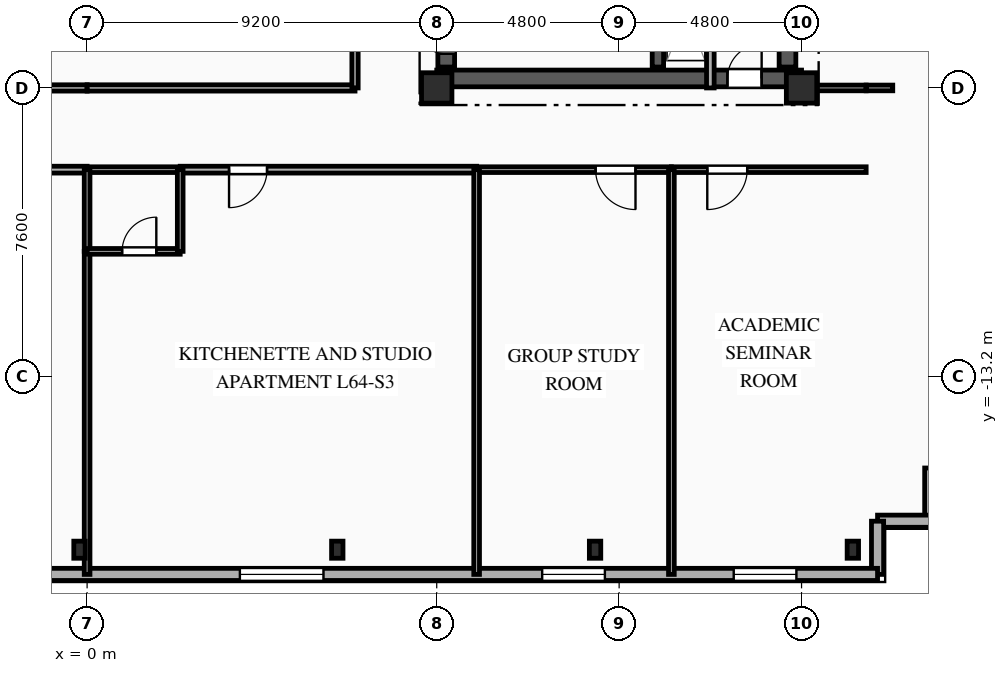
"""IFC4 building model, lengths in metres.
Left out: names, types, materials, properties, quantities, classifications, styles, units other than length and angle.
Written with IfcOpenShell. Run it as: python <this file> out.ifc"""

import sys

from ifc_helpers import new_model, si_unit, direction, frame, frame_2d, origin, origin_2d, place, context, subcontext, project, spatial, rectangle, i_section, extrude, element, fill, save


model = new_model("IFC4")
c1 = context("Model", 3, precision=1e-05, world=origin(), true_north=direction((0.0, 1.0)))
c2 = subcontext(c1, "Body", "Model", "MODEL_VIEW")
j1 = project(units=[si_unit("LENGTHUNIT", "METRE"), si_unit("PLANEANGLEUNIT", "RADIAN")], contexts=[c1])
p1 = place(None, origin())
s1 = spatial("IfcSite", under=j1, at=p1, CompositionType="ELEMENT")
p2 = place(p1, origin())
s2 = spatial("IfcBuilding", under=s1, at=p2, CompositionType="ELEMENT")
p3 = place(p2, frame((0.0, 0.0, 228.3)))
s3 = spatial("IfcBuildingStorey", under=s2, at=p3, CompositionType="ELEMENT", Elevation=228.3)
for number, where, z_axis, x_axis in (
    (1, (9.2, -5.6, 0.0), (0.0, 0.0, 1.0), (1.0, 0.0, 0.0)),
    (2, (18.8, -5.6, 0.0), (0.0, 0.0, 1.0), (1.0, 0.0, 0.0)),
):
    element("IfcColumn", number, at=place(p3, frame(where, z_axis=z_axis, x_axis=x_axis)), inside=s3, PredefinedType="COLUMN", context=c2, shape_type="SweptSolid", body=[
        extrude(rectangle(XDim=0.8, YDim=0.8, at=origin_2d()), origin(), (0.0, 0.0, 1.0), 3.35),
    ])
for number, where, z_axis, x_axis in (
    (3, (-0.2, -17.75, 0.0), (0.0, 0.0, 1.0), (1.0, 0.0, 0.0)),
    (4, (6.583, -17.75, 0.0), (0.0, 0.0, 1.0), (1.0, 0.0, 0.0)),
    (5, (13.367, -17.75, 0.0), (0.0, 0.0, 1.0), (1.0, 0.0, 0.0)),
    (6, (20.15, -17.75, 0.0), (0.0, 0.0, 1.0), (1.0, 0.0, 0.0)),
):
    element("IfcColumn", number, at=place(p3, frame(where, z_axis=z_axis, x_axis=x_axis)), inside=s3, PredefinedType="COLUMN", context=c2, shape_type="SweptSolid", body=[
        extrude(i_section(OverallWidth=0.3, OverallDepth=0.45, WebThickness=0.014, FlangeThickness=0.026, FilletRadius=0.027, at=origin_2d()), origin(), (0.0, 0.0, 1.0), 3.35),
    ])
for number, where, z_axis, x_axis in (
    (7, (22.2, -15.6, 0.0), (0.0, 0.0, 1.0), (0.0, -1.0, 0.0)),
    (8, (22.2, -17.0, 0.0), (0.0, 0.0, 1.0), (-1.0, 0.0, 0.0)),
    (9, (20.8, -17.0, 0.0), (0.0, 0.0, 1.0), (0.0, -1.0, 0.0)),
):
    element("IfcWall", number, at=place(p3, frame(where, z_axis=z_axis, x_axis=x_axis)), inside=s3, PredefinedType="SOLIDWALL", context=c2, shape_type="SweptSolid", body=[
        extrude(rectangle(XDim=1.4, YDim=0.32, at=frame_2d((0.7, 0.0))), origin(), (0.0, 0.0, 1.0), 3.04),
    ])
p4 = place(p3, frame((20.8, -18.4, 0.0), z_axis=(0.0, 0.0, 1.0), x_axis=(-1.0, 0.0, 0.0)))
e10 = element("IfcWall", 10, at=p4, inside=s3, PredefinedType="SOLIDWALL", context=c2, shape_type="SweptSolid", body=[
    extrude(rectangle(XDim=42.0, YDim=0.32, at=frame_2d((21.0, 0.0))), origin(), (0.0, 0.0, 1.0), 3.04),
])
p5 = place(p4, frame((2.135, 0.0, 0.85)))
e11 = element("IfcOpeningElement", 11, at=p5, cuts=e10, PredefinedType="OPENING", context=c2, shape_type="SweptSolid", body=[
    extrude(rectangle(XDim=1.65, YDim=1.85, at=frame_2d((0.825, 0.925))), frame((0.0, 0.17, 0.0), z_axis=(0.0, -1.0, 0.0), x_axis=(1.0, 0.0, 0.0)), (0.0, 0.0, 1.0), 0.34),
])
p6 = place(p4, frame((7.175, 0.0, 0.85)))
e12 = element("IfcOpeningElement", 12, at=p6, cuts=e10, PredefinedType="OPENING", context=c2, shape_type="SweptSolid", body=[
    extrude(rectangle(XDim=1.65, YDim=1.85, at=frame_2d((0.825, 0.925))), frame((0.0, 0.17, 0.0), z_axis=(0.0, -1.0, 0.0), x_axis=(1.0, 0.0, 0.0)), (0.0, 0.0, 1.0), 0.34),
])
p7 = place(p4, frame((14.58, 0.0, 0.85)))
e13 = element("IfcOpeningElement", 13, at=p7, cuts=e10, PredefinedType="OPENING", context=c2, shape_type="SweptSolid", body=[
    extrude(rectangle(XDim=2.2, YDim=1.85, at=frame_2d((1.1, 0.925))), frame((0.0, 0.17, 0.0), z_axis=(0.0, -1.0, 0.0), x_axis=(1.0, 0.0, 0.0)), (0.0, 0.0, 1.0), 0.34),
])
p8 = place(p4, frame((24.9, 0.0, 0.85)))
e14 = element("IfcOpeningElement", 14, at=p8, cuts=e10, PredefinedType="OPENING", context=c2, shape_type="SweptSolid", body=[
    extrude(rectangle(XDim=2.2, YDim=1.85, at=frame_2d((1.1, 0.925))), frame((0.0, 0.17, 0.0), z_axis=(0.0, -1.0, 0.0), x_axis=(1.0, 0.0, 0.0)), (0.0, 0.0, 1.0), 0.34),
])
p9 = place(p4, frame((32.855, 0.0, 0.85)))
e15 = element("IfcOpeningElement", 15, at=p9, cuts=e10, PredefinedType="OPENING", context=c2, shape_type="SweptSolid", body=[
    extrude(rectangle(XDim=1.65, YDim=1.85, at=frame_2d((0.825, 0.925))), frame((0.0, 0.17, 0.0), z_axis=(0.0, -1.0, 0.0), x_axis=(1.0, 0.0, 0.0)), (0.0, 0.0, 1.0), 0.34),
])
p10 = place(p4, frame((37.975, 0.0, 0.85)))
e16 = element("IfcOpeningElement", 16, at=p10, cuts=e10, PredefinedType="OPENING", context=c2, shape_type="SweptSolid", body=[
    extrude(rectangle(XDim=1.65, YDim=1.85, at=frame_2d((0.825, 0.925))), frame((0.0, 0.17, 0.0), z_axis=(0.0, -1.0, 0.0), x_axis=(1.0, 0.0, 0.0)), (0.0, 0.0, 1.0), 0.34),
])
p11 = place(p3, frame((9.2, -5.35, 0.0), z_axis=(0.0, 0.0, 1.0), x_axis=(1.0, 0.0, 0.0)))
e17 = element("IfcWall", 17, at=p11, inside=s3, PredefinedType="SHEAR", context=c2, shape_type="SweptSolid", body=[
    extrude(rectangle(XDim=9.6, YDim=0.44, at=frame_2d((4.8, 0.0))), origin(), (0.0, 0.0, 1.0), 3.04),
])
p12 = place(p11, frame((7.65, 0.0, 0.0)))
e18 = element("IfcOpeningElement", 18, at=p12, cuts=e17, PredefinedType="OPENING", context=c2, shape_type="SweptSolid", body=[
    extrude(rectangle(XDim=0.9, YDim=2.1, at=frame_2d((0.45, 1.05))), frame((0.0, 0.23, 0.0), z_axis=(0.0, -1.0, 0.0), x_axis=(1.0, 0.0, 0.0)), (0.0, 0.0, 1.0), 0.46),
])
p13 = place(p3, frame((9.45, -5.05, 0.0), z_axis=(0.0, 0.0, 1.0), x_axis=(0.0, 1.0, 0.0)))
e19 = element("IfcWall", 19, at=p13, inside=s3, PredefinedType="SHEAR", context=c2, shape_type="SweptSolid", body=[
    extrude(rectangle(XDim=10.1, YDim=0.44, at=frame_2d((5.05, 0.0))), origin(), (0.0, 0.0, 1.0), 3.04),
])
p14 = place(p13, frame((7.15, 0.0, 0.0)))
e20 = element("IfcOpeningElement", 20, at=p14, cuts=e19, PredefinedType="OPENING", context=c2, shape_type="SweptSolid", body=[
    extrude(rectangle(XDim=0.9, YDim=2.1, at=frame_2d((0.45, 1.05))), frame((0.0, 0.23, 0.0), z_axis=(0.0, -1.0, 0.0), x_axis=(1.0, 0.0, 0.0)), (0.0, 0.0, 1.0), 0.46),
])
p15 = place(p13, frame((2.4, 0.0, 0.0)))
e21 = element("IfcOpeningElement", 21, at=p15, cuts=e19, PredefinedType="OPENING", context=c2, shape_type="SweptSolid", body=[
    extrude(rectangle(XDim=1.2, YDim=2.15, at=frame_2d((0.6, 1.075))), frame((0.0, 0.23, 0.0), z_axis=(0.0, -1.0, 0.0), x_axis=(1.0, 0.0, 0.0)), (0.0, 0.0, 1.0), 0.46),
])
p16 = place(p13, frame((0.35, 0.0, 0.0)))
e22 = element("IfcOpeningElement", 22, at=p16, cuts=e19, PredefinedType="OPENING", context=c2, shape_type="SweptSolid", body=[
    extrude(rectangle(XDim=0.9, YDim=2.1, at=frame_2d((0.45, 1.05))), frame((0.0, 0.23, 0.0), z_axis=(0.0, -1.0, 0.0), x_axis=(1.0, 0.0, 0.0)), (0.0, 0.0, 1.0), 0.46),
])
p17 = place(p3, frame((18.43, -5.05, 0.0), z_axis=(0.0, 0.0, 1.0), x_axis=(0.0, 1.0, 0.0)))
e23 = element("IfcWall", 23, at=p17, inside=s3, PredefinedType="SHEAR", context=c2, shape_type="SweptSolid", body=[
    extrude(rectangle(XDim=10.1, YDim=0.44, at=frame_2d((5.05, 0.0))), origin(), (0.0, 0.0, 1.0), 3.04),
])
p18 = place(p3, frame((15.02, -5.05, 0.0), z_axis=(0.0, 0.0, 1.0), x_axis=(0.0, 1.0, 0.0)))
e24 = element("IfcWall", 24, at=p18, inside=s3, PredefinedType="SHEAR", context=c2, shape_type="SweptSolid", body=[
    extrude(rectangle(XDim=10.1, YDim=0.3, at=frame_2d((5.05, 0.0))), origin(), (0.0, 0.0, 1.0), 3.04),
])
p19 = place(p3, frame((16.4, -2.11, 0.0), z_axis=(0.0, 0.0, 1.0), x_axis=(0.0, -1.0, 0.0)))
e25 = element("IfcWall", 25, at=p19, inside=s3, PredefinedType="PARTITIONING", context=c2, shape_type="SweptSolid", body=[
    extrude(rectangle(XDim=3.49, YDim=0.2, at=frame_2d((1.745, 0.0))), origin(), (0.0, 0.0, 1.0), 3.04),
])
p20 = place(p3, frame((0.0, -7.75, 0.0), z_axis=(0.0, 0.0, 1.0), x_axis=(-1.0, 0.0, 0.0)))
e26 = element("IfcWall", 26, at=p20, inside=s3, PredefinedType="PARTITIONING", context=c2, shape_type="SweptSolid", body=[
    extrude(rectangle(XDim=7.8, YDim=0.18, at=frame_2d((3.9, 0.0))), origin(), (0.0, 0.0, 1.0), 3.04),
])
p21 = place(p20, frame((1.285, 0.0, 0.0)))
e27 = element("IfcOpeningElement", 27, at=p21, cuts=e26, PredefinedType="OPENING", context=c2, shape_type="SweptSolid", body=[
    extrude(rectangle(XDim=1.0, YDim=2.15, at=frame_2d((0.5, 1.075))), frame((0.0, 0.1, 0.0), z_axis=(0.0, -1.0, 0.0), x_axis=(1.0, 0.0, 0.0)), (0.0, 0.0, 1.0), 0.2),
])
p22 = place(p3, frame((-7.05, -5.6, 0.0), z_axis=(0.0, 0.0, 1.0), x_axis=(1.0, 0.0, 0.0)))
e28 = element("IfcWall", 28, at=p22, inside=s3, PredefinedType="PARTITIONING", context=c2, shape_type="SweptSolid", body=[
    extrude(rectangle(XDim=7.05, YDim=0.165, at=frame_2d((3.525, 0.0))), origin(), (0.0, 0.0, 1.0), 2.525),
])
p23 = place(p22, frame((4.728, 0.0, 0.0)))
e29 = element("IfcOpeningElement", 29, at=p23, cuts=e28, PredefinedType="OPENING", context=c2, shape_type="SweptSolid", body=[
    extrude(rectangle(XDim=1.15, YDim=2.15, at=frame_2d((0.575, 1.075))), frame((0.0, 0.093, 0.0), z_axis=(0.0, -1.0, 0.0), x_axis=(1.0, 0.0, 0.0)), (0.0, 0.0, 1.0), 0.185),
])
p24 = place(p3, frame((18.8, -5.6, 0.0), z_axis=(0.0, 0.0, 1.0), x_axis=(1.0, 0.0, 0.0)))
e30 = element("IfcWall", 30, at=p24, inside=s3, PredefinedType="PARTITIONING", context=c2, shape_type="SweptSolid", body=[
    extrude(rectangle(XDim=1.7, YDim=0.15, at=frame_2d((0.85, 0.0))), origin(), (0.0, 0.0, 1.0), 3.04),
])
p25 = place(p3, frame((20.5, -5.6, 0.0), z_axis=(0.0, 0.0, 1.0), x_axis=(1.0, 0.0, 0.0)))
e31 = element("IfcWall", 31, at=p25, inside=s3, PredefinedType="PARTITIONING", context=c2, shape_type="SweptSolid", body=[
    extrude(rectangle(XDim=0.7, YDim=0.15, at=frame_2d((0.35, 0.0))), origin(), (0.0, 0.0, 1.0), 3.04),
])
p26 = place(p3, frame((10.25, -7.75, 0.0), z_axis=(0.0, 0.0, 1.0), x_axis=(-1.0, 0.0, 0.0)))
e32 = element("IfcWall", 32, at=p26, inside=s3, PredefinedType="PARTITIONING", context=c2, shape_type="SweptSolid", body=[
    extrude(rectangle(XDim=7.8, YDim=0.18, at=frame_2d((3.9, 0.0))), origin(), (0.0, 0.0, 1.0), 3.04),
])
p27 = place(p26, frame((5.515, 0.0, 0.0)))
e33 = element("IfcOpeningElement", 33, at=p27, cuts=e32, PredefinedType="OPENING", context=c2, shape_type="SweptSolid", body=[
    extrude(rectangle(XDim=1.0, YDim=2.15, at=frame_2d((0.5, 1.075))), frame((0.0, 0.1, 0.0), z_axis=(0.0, -1.0, 0.0), x_axis=(1.0, 0.0, 0.0)), (0.0, 0.0, 1.0), 0.2),
])
p28 = place(p3, frame((2.45, -7.75, 0.0), z_axis=(0.0, 0.0, 1.0), x_axis=(-1.0, 0.0, 0.0)))
e34 = element("IfcWall", 34, at=p28, inside=s3, PredefinedType="PLUMBINGWALL", context=c2, shape_type="SweptSolid", body=[
    extrude(rectangle(XDim=2.45, YDim=0.15, at=frame_2d((1.225, 0.0))), origin(), (0.0, 0.0, 1.0), 3.04),
])
p29 = place(p3, frame((15.375, -7.75, 0.0), z_axis=(0.0, 0.0, 1.0), x_axis=(-1.0, 0.0, 0.0)))
e35 = element("IfcWall", 35, at=p29, inside=s3, PredefinedType="PARTITIONING", context=c2, shape_type="SweptSolid", body=[
    extrude(rectangle(XDim=5.125, YDim=0.15, at=frame_2d((2.562, 0.0))), origin(), (0.0, 0.0, 1.0), 3.04),
])
p30 = place(p29, frame((0.944, 0.0, 0.0)))
e36 = element("IfcOpeningElement", 36, at=p30, cuts=e35, PredefinedType="OPENING", context=c2, shape_type="SweptSolid", body=[
    extrude(rectangle(XDim=1.05, YDim=2.15, at=frame_2d((0.525, 1.075))), frame((0.0, 0.085, 0.0), z_axis=(0.0, -1.0, 0.0), x_axis=(1.0, 0.0, 0.0)), (0.0, 0.0, 1.0), 0.17),
])
p31 = place(p3, frame((20.5, -7.75, 0.0), z_axis=(0.0, 0.0, 1.0), x_axis=(-1.0, 0.0, 0.0)))
e37 = element("IfcWall", 37, at=p31, inside=s3, PredefinedType="PARTITIONING", context=c2, shape_type="SweptSolid", body=[
    extrude(rectangle(XDim=5.125, YDim=0.15, at=frame_2d((2.562, 0.0))), origin(), (0.0, 0.0, 1.0), 3.04),
])
p32 = place(p31, frame((3.131, 0.0, 0.0)))
e38 = element("IfcOpeningElement", 38, at=p32, cuts=e37, PredefinedType="OPENING", context=c2, shape_type="SweptSolid", body=[
    extrude(rectangle(XDim=1.05, YDim=2.15, at=frame_2d((0.525, 1.075))), frame((0.0, 0.085, 0.0), z_axis=(0.0, -1.0, 0.0), x_axis=(1.0, 0.0, 0.0)), (0.0, 0.0, 1.0), 0.17),
])
p33 = place(p3, frame((0.0, -5.6, 0.0), z_axis=(0.0, 0.0, 1.0), x_axis=(1.0, 0.0, 0.0)))
e39 = element("IfcWall", 39, at=p33, inside=s3, PredefinedType="PARTITIONING", context=c2, shape_type="SweptSolid", body=[
    extrude(rectangle(XDim=7.05, YDim=0.165, at=frame_2d((3.525, 0.0))), origin(), (0.0, 0.0, 1.0), 2.525),
])
p34 = place(p3, frame((7.05, -5.6, 0.0), z_axis=(0.0, 0.0, 1.0), x_axis=(0.0, 1.0, 0.0)))
e40 = element("IfcWall", 40, at=p34, inside=s3, PredefinedType="PARTITIONING", context=c2, shape_type="SweptSolid", body=[
    extrude(rectangle(XDim=7.05, YDim=0.165, at=frame_2d((3.525, 0.0))), origin(), (0.0, 0.0, 1.0), 3.04),
])
p35 = place(p3, frame((0.0, -9.9, 0.0), z_axis=(0.0, 0.0, 1.0), x_axis=(0.0, -1.0, 0.0)))
e41 = element("IfcWall", 41, at=p35, inside=s3, PredefinedType="PARTITIONING", context=c2, shape_type="SweptSolid", body=[
    extrude(rectangle(XDim=8.5, YDim=0.15, at=frame_2d((4.25, 0.0))), origin(), (0.0, 0.0, 1.0), 3.04),
])
p36 = place(p3, frame((0.0, -7.75, 0.0), z_axis=(0.0, 0.0, 1.0), x_axis=(0.0, -1.0, 0.0)))
e42 = element("IfcWall", 42, at=p36, inside=s3, PredefinedType="PLUMBINGWALL", context=c2, shape_type="SweptSolid", body=[
    extrude(rectangle(XDim=2.15, YDim=0.15, at=frame_2d((1.075, 0.0))), origin(), (0.0, 0.0, 1.0), 3.04),
])
p37 = place(p3, frame((0.0, -9.9, 0.0), z_axis=(0.0, 0.0, 1.0), x_axis=(1.0, 0.0, 0.0)))
e43 = element("IfcWall", 43, at=p37, inside=s3, PredefinedType="PLUMBINGWALL", context=c2, shape_type="SweptSolid", body=[
    extrude(rectangle(XDim=2.45, YDim=0.15, at=frame_2d((1.225, 0.0))), origin(), (0.0, 0.0, 1.0), 3.04),
])
p38 = place(p37, frame((0.921, 0.0, 0.0)))
e44 = element("IfcOpeningElement", 44, at=p38, cuts=e43, PredefinedType="OPENING", context=c2, shape_type="SweptSolid", body=[
    extrude(rectangle(XDim=0.9, YDim=2.1, at=frame_2d((0.45, 1.05))), frame((0.0, 0.085, 0.0), z_axis=(0.0, -1.0, 0.0), x_axis=(1.0, 0.0, 0.0)), (0.0, 0.0, 1.0), 0.17),
])
p39 = place(p3, frame((2.45, -9.9, 0.0), z_axis=(0.0, 0.0, 1.0), x_axis=(0.0, 1.0, 0.0)))
e45 = element("IfcWall", 45, at=p39, inside=s3, PredefinedType="PLUMBINGWALL", context=c2, shape_type="SweptSolid", body=[
    extrude(rectangle(XDim=2.15, YDim=0.15, at=frame_2d((1.075, 0.0))), origin(), (0.0, 0.0, 1.0), 3.04),
])
for number, where, z_axis, x_axis in (
    (46, (10.25, -7.75, 0.0), (0.0, 0.0, 1.0), (0.0, -1.0, 0.0)),
    (47, (15.375, -7.75, 0.0), (0.0, 0.0, 1.0), (0.0, -1.0, 0.0)),
):
    element("IfcWall", number, at=place(p3, frame(where, z_axis=z_axis, x_axis=x_axis)), inside=s3, PredefinedType="PARTITIONING", context=c2, shape_type="SweptSolid", body=[
        extrude(rectangle(XDim=10.65, YDim=0.15, at=frame_2d((5.325, 0.0))), origin(), (0.0, 0.0, 1.0), 3.04),
    ])
p40 = place(p5, origin())
e48 = element("IfcWindow", 48, at=p40, inside=s3, PartitioningType="SINGLE_PANEL", PredefinedType="WINDOW", context=c2, shape_type="SweptSolid", body=[
    extrude(rectangle(XDim=1.65, YDim=1.85, at=frame_2d((0.825, 0.925))), frame((0.0, 0.03, 0.0), z_axis=(0.0, -1.0, 0.0), x_axis=(1.0, 0.0, 0.0)), (0.0, 0.0, 1.0), 0.06),
])
fill(e11, e48)
p41 = place(p6, origin())
e49 = element("IfcWindow", 49, at=p41, inside=s3, PartitioningType="SINGLE_PANEL", PredefinedType="WINDOW", context=c2, shape_type="SweptSolid", body=[
    extrude(rectangle(XDim=1.65, YDim=1.85, at=frame_2d((0.825, 0.925))), frame((0.0, 0.03, 0.0), z_axis=(0.0, -1.0, 0.0), x_axis=(1.0, 0.0, 0.0)), (0.0, 0.0, 1.0), 0.06),
])
fill(e12, e49)
p42 = place(p7, origin())
e50 = element("IfcWindow", 50, at=p42, inside=s3, PartitioningType="SINGLE_PANEL", PredefinedType="WINDOW", context=c2, shape_type="SweptSolid", body=[
    extrude(rectangle(XDim=2.2, YDim=1.85, at=frame_2d((1.1, 0.925))), frame((0.0, 0.03, 0.0), z_axis=(0.0, -1.0, 0.0), x_axis=(1.0, 0.0, 0.0)), (0.0, 0.0, 1.0), 0.06),
])
fill(e13, e50)
p43 = place(p12, origin())
e51 = element("IfcDoor", 51, at=p43, inside=s3, OperationType="SINGLE_SWING_RIGHT", PredefinedType="DOOR", context=c2, shape_type="SweptSolid", body=[
    extrude(rectangle(XDim=0.9, YDim=2.1, at=frame_2d((0.45, 1.05))), frame((0.0, 0.025, 0.0), z_axis=(0.0, -1.0, 0.0), x_axis=(1.0, 0.0, 0.0)), (0.0, 0.0, 1.0), 0.05),
])
fill(e18, e51)
p44 = place(p16, origin())
e52 = element("IfcDoor", 52, at=p44, inside=s3, OperationType="SINGLE_SWING_RIGHT", PredefinedType="DOOR", context=c2, shape_type="SweptSolid", body=[
    extrude(rectangle(XDim=0.9, YDim=2.1, at=frame_2d((0.45, 1.05))), frame((0.0, 0.025, 0.0), z_axis=(0.0, -1.0, 0.0), x_axis=(1.0, 0.0, 0.0)), (0.0, 0.0, 1.0), 0.05),
])
fill(e22, e52)
p45 = place(p27, origin())
e53 = element("IfcDoor", 53, at=p45, inside=s3, OperationType="SINGLE_SWING_RIGHT", PredefinedType="DOOR", context=c2, shape_type="SweptSolid", body=[
    extrude(rectangle(XDim=1.0, YDim=2.15, at=frame_2d((0.5, 1.075))), frame((0.0, 0.025, 0.0), z_axis=(0.0, -1.0, 0.0), x_axis=(1.0, 0.0, 0.0)), (0.0, 0.0, 1.0), 0.05),
])
fill(e33, e53)
p46 = place(p30, origin())
e54 = element("IfcDoor", 54, at=p46, inside=s3, OperationType="SINGLE_SWING_LEFT", PredefinedType="DOOR", context=c2, shape_type="SweptSolid", body=[
    extrude(rectangle(XDim=1.05, YDim=2.15, at=frame_2d((0.525, 1.075))), frame((0.0, 0.025, 0.0), z_axis=(0.0, -1.0, 0.0), x_axis=(1.0, 0.0, 0.0)), (0.0, 0.0, 1.0), 0.05),
])
fill(e36, e54)
p47 = place(p32, origin())
e55 = element("IfcDoor", 55, at=p47, inside=s3, OperationType="SINGLE_SWING_RIGHT", PredefinedType="DOOR", context=c2, shape_type="SweptSolid", body=[
    extrude(rectangle(XDim=1.05, YDim=2.15, at=frame_2d((0.525, 1.075))), frame((0.0, 0.025, 0.0), z_axis=(0.0, -1.0, 0.0), x_axis=(1.0, 0.0, 0.0)), (0.0, 0.0, 1.0), 0.05),
])
fill(e38, e55)
p48 = place(p38, origin())
e56 = element("IfcDoor", 56, at=p48, inside=s3, OperationType="SINGLE_SWING_RIGHT", PredefinedType="DOOR", context=c2, shape_type="SweptSolid", body=[
    extrude(rectangle(XDim=0.9, YDim=2.1, at=frame_2d((0.45, 1.05))), frame((0.0, 0.025, 0.0), z_axis=(0.0, -1.0, 0.0), x_axis=(1.0, 0.0, 0.0)), (0.0, 0.0, 1.0), 0.05),
])
fill(e44, e56)
save(model, sys.argv[1])
